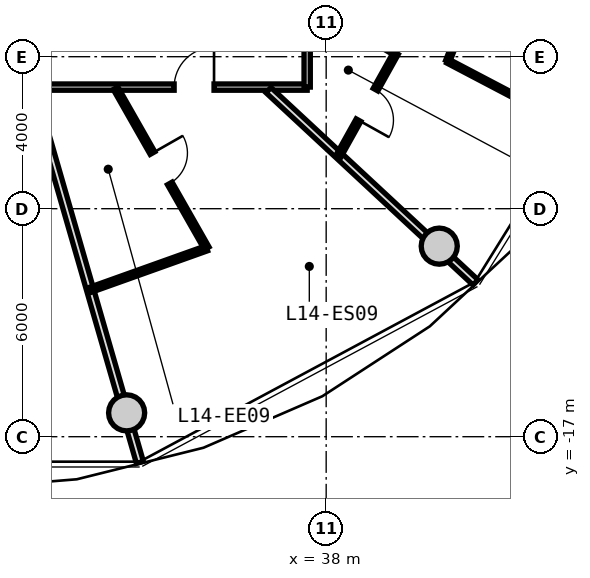
"""IFC4 building model, lengths in metres.
Left out: names, types, materials, properties, quantities, classifications, styles, units other than length and angle.
Written with IfcOpenShell. Run it as: python <this file> out.ifc"""

import sys

from ifc_helpers import new_model, si_unit, direction, frame, frame_2d, origin, origin_2d, place, context, subcontext, project, spatial, rectangle, circle, extrude, source, transform, mapped, element, fill, save


model = new_model("IFC4")
c1 = context("Model", 3, precision=1e-05, world=origin(), true_north=direction((0.0, 1.0)))
c2 = subcontext(c1, "Body", "Model", "MODEL_VIEW")
j1 = project(units=[si_unit("LENGTHUNIT", "METRE"), si_unit("PLANEANGLEUNIT", "RADIAN")], contexts=[c1])
p1 = place(None, origin())
s1 = spatial("IfcSite", under=j1, at=p1, CompositionType="ELEMENT")
p2 = place(p1, origin())
s2 = spatial("IfcBuilding", under=s1, at=p2, CompositionType="ELEMENT")
p3 = place(p2, frame((0.0, 0.0, 49.05)))
s3 = spatial("IfcBuildingStorey", under=s2, at=p3, CompositionType="ELEMENT", Elevation=49.05)
m1 = source(origin(), c2, "Body", "SweptSolid", [
    extrude(circle(Radius=0.475, at=origin_2d()), origin(), (0.0, 0.0, 1.0), 3.05),
])
for number, where, z_axis, x_axis in (
    (1, (32.749, -16.373, 0.0), (0.0, 0.0, 1.0), (1.0, 0.0, 0.0)),
    (2, (40.975, -11.985, 0.0), (0.0, 0.0, 1.0), (1.0, 0.0, 0.0)),
):
    element("IfcColumn", number, at=place(p3, frame(where, z_axis=z_axis, x_axis=x_axis)), inside=s3, PredefinedType="COLUMN", context=c2, shape_type="MappedRepresentation", body=[
        mapped(m1, transform((0.0, 0.0, 0.0), x_axis=(1.0, 0.0, 0.0), y_axis=(0.0, 1.0, 0.0), z_axis=(0.0, 0.0, 1.0), scale=1.0)),
    ])
m2 = source(origin(), c2, "Body", "SweptSolid", [
    extrude(rectangle(XDim=19.0, YDim=0.165, at=frame_2d((9.5, 0.0))), origin(), (0.0, 0.0, 1.0), 2.775),
])
p4 = place(p3, frame((37.5, -7.8, 0.0), z_axis=(0.0, 0.0, 1.0), x_axis=(-1.0, 0.0, 0.0)))
e3 = element("IfcWall", 3, at=p4, inside=s3, PredefinedType="PARTITIONING", context=c2, shape_type="MappedRepresentation", body=[
    mapped(m2, transform((0.0, 0.0, 0.0), x_axis=(1.0, 0.0, 0.0), y_axis=(0.0, 1.0, 0.0), z_axis=(0.0, 0.0, 1.0), scale=1.0)),
])
p5 = place(p4, frame((12.706, 0.0, 0.0)))
e4 = element("IfcOpeningElement", 4, at=p5, cuts=e3, PredefinedType="OPENING", context=c2, shape_type="SweptSolid", body=[
    extrude(rectangle(XDim=1.05, YDim=2.15, at=frame_2d((0.525, 1.075))), frame((0.0, 0.093, 0.0), z_axis=(0.0, -1.0, 0.0), x_axis=(1.0, 0.0, 0.0)), (0.0, 0.0, 1.0), 0.185),
])
p6 = place(p4, frame((7.959, 0.0, 0.0)))
e5 = element("IfcOpeningElement", 5, at=p6, cuts=e3, PredefinedType="OPENING", context=c2, shape_type="SweptSolid", body=[
    extrude(rectangle(XDim=1.05, YDim=2.15, at=frame_2d((0.525, 1.075))), frame((0.0, 0.093, 0.0), z_axis=(0.0, -1.0, 0.0), x_axis=(1.0, 0.0, 0.0)), (0.0, 0.0, 1.0), 0.185),
])
p7 = place(p4, frame((2.451, 0.0, 0.0)))
e6 = element("IfcOpeningElement", 6, at=p7, cuts=e3, PredefinedType="OPENING", context=c2, shape_type="SweptSolid", body=[
    extrude(rectangle(XDim=1.05, YDim=2.15, at=frame_2d((0.525, 1.075))), frame((0.0, 0.093, 0.0), z_axis=(0.0, -1.0, 0.0), x_axis=(1.0, 0.0, 0.0)), (0.0, 0.0, 1.0), 0.185),
])
m3 = source(origin(), c2, "Body", "SweptSolid", [
    extrude(rectangle(XDim=15.6, YDim=0.165, at=frame_2d((7.8, 0.0))), origin(), (0.0, 0.0, 1.0), 2.775),
])
p8 = place(p3, frame((37.5, 7.8, 0.0), z_axis=(0.0, 0.0, 1.0), x_axis=(0.0, -1.0, 0.0)))
e7 = element("IfcWall", 7, at=p8, inside=s3, PredefinedType="PARTITIONING", context=c2, shape_type="MappedRepresentation", body=[
    mapped(m3, transform((0.0, 0.0, 0.0), x_axis=(1.0, 0.0, 0.0), y_axis=(0.0, 1.0, 0.0), z_axis=(0.0, 0.0, 1.0), scale=1.0)),
])
p9 = place(p8, frame((8.835, 0.0, 0.0)))
e8 = element("IfcOpeningElement", 8, at=p9, cuts=e7, PredefinedType="OPENING", context=c2, shape_type="SweptSolid", body=[
    extrude(rectangle(XDim=1.05, YDim=2.15, at=frame_2d((0.525, 1.075))), frame((0.0, 0.093, 0.0), z_axis=(0.0, -1.0, 0.0), x_axis=(1.0, 0.0, 0.0)), (0.0, 0.0, 1.0), 0.185),
])
p10 = place(p8, frame((2.208, 0.0, 0.0)))
e9 = element("IfcOpeningElement", 9, at=p10, cuts=e7, PredefinedType="OPENING", context=c2, shape_type="SweptSolid", body=[
    extrude(rectangle(XDim=1.25, YDim=2.2, at=frame_2d((0.625, 1.1))), frame((0.0, 0.093, 0.0), z_axis=(0.0, -1.0, 0.0), x_axis=(1.0, 0.0, 0.0)), (0.0, 0.0, 1.0), 0.185),
])
m4 = source(origin(), c2, "Body", "SweptSolid", [
    extrude(rectangle(XDim=10.196, YDim=0.19, at=frame_2d((5.098, 0.0))), origin(), (0.0, 0.0, 1.0), 2.225),
])
p11 = place(p3, frame((30.273, -7.88, 0.0), z_axis=(0.0, 0.0, 1.0), x_axis=(0.277136420347, -0.960830580549, 0.0)))
e10 = element("IfcWall", 10, at=p11, inside=s3, PredefinedType="PARTITIONING", context=c2, shape_type="MappedRepresentation", body=[
    mapped(m4, transform((0.0, 0.0, 0.0), x_axis=(1.0, 0.0, 0.0), y_axis=(0.0, 1.0, 0.0), z_axis=(0.0, 0.0, 1.0), scale=1.0)),
])
m5 = source(origin(), c2, "Body", "SweptSolid", [
    extrude(rectangle(XDim=7.435, YDim=0.19, at=frame_2d((3.717, 0.0))), origin(), (0.0, 0.0, 1.0), 2.225),
])
p12 = place(p3, frame((36.483, -7.88, 0.0), z_axis=(0.0, 0.0, 1.0), x_axis=(0.732651956848, -0.680603489652, 0.0)))
e11 = element("IfcWall", 11, at=p12, inside=s3, PredefinedType="PARTITIONING", context=c2, shape_type="MappedRepresentation", body=[
    mapped(m5, transform((0.0, 0.0, 0.0), x_axis=(1.0, 0.0, 0.0), y_axis=(0.0, 1.0, 0.0), z_axis=(0.0, 0.0, 1.0), scale=1.0)),
])
m6 = source(origin(), c2, "Body", "SweptSolid", [
    extrude(rectangle(XDim=4.846, YDim=0.14, at=frame_2d((2.423, 0.0))), origin(), (0.0, 0.0, 1.0), 2.775),
])
p13 = place(p3, frame((32.458, -7.83, 0.0), z_axis=(0.0, 0.0, 1.0), x_axis=(0.494841788743, -0.868983086207, 0.0)))
e12 = element("IfcWall", 12, at=p13, inside=s3, PredefinedType="PARTITIONING", context=c2, shape_type="MappedRepresentation", body=[
    mapped(m6, transform((0.0, 0.0, 0.0), x_axis=(1.0, 0.0, 0.0), y_axis=(0.0, 1.0, 0.0), z_axis=(0.0, 0.0, 1.0), scale=1.0)),
])
p14 = place(p13, frame((1.963, 0.0, 0.0)))
e13 = element("IfcOpeningElement", 13, at=p14, cuts=e12, PredefinedType="OPENING", context=c2, shape_type="SweptSolid", body=[
    extrude(rectangle(XDim=0.92, YDim=2.1, at=frame_2d((0.46, 1.05))), frame((0.0, 0.08, 0.0), z_axis=(0.0, -1.0, 0.0), x_axis=(1.0, 0.0, 0.0)), (0.0, 0.0, 1.0), 0.16),
])
m7 = source(origin(), c2, "Body", "SweptSolid", [
    extrude(rectangle(XDim=3.276, YDim=0.14, at=frame_2d((1.638, 0.0))), origin(), (0.0, 0.0, 1.0), 2.415),
])
p15 = place(p3, frame((34.857, -12.042, 0.0), z_axis=(0.0, 0.0, 1.0), x_axis=(-0.94174696961, -0.336322234221, 0.0)))
e14 = element("IfcWall", 14, at=p15, inside=s3, PredefinedType="PARTITIONING", context=c2, shape_type="MappedRepresentation", body=[
    mapped(m7, transform((0.0, 0.0, 0.0), x_axis=(1.0, 0.0, 0.0), y_axis=(0.0, 1.0, 0.0), z_axis=(0.0, 0.0, 1.0), scale=1.0)),
])
m8 = source(origin(), c2, "Body", "SweptSolid", [
    extrude(rectangle(XDim=2.669, YDim=0.14, at=frame_2d((1.335, 0.0))), origin(), (0.0, 0.0, 1.0), 2.775),
])
p16 = place(p3, frame((37.53, -5.561, 0.0), z_axis=(0.0, 0.0, 1.0), x_axis=(0.86369928178, -0.50400749067, 0.0)))
e15 = element("IfcWall", 15, at=p16, inside=s3, PredefinedType="PARTITIONING", context=c2, shape_type="MappedRepresentation", body=[
    mapped(m8, transform((0.0, 0.0, 0.0), x_axis=(1.0, 0.0, 0.0), y_axis=(0.0, 1.0, 0.0), z_axis=(0.0, 0.0, 1.0), scale=1.0)),
])
m9 = source(origin(), c2, "Body", "SweptSolid", [
    extrude(rectangle(XDim=3.121, YDim=0.14, at=frame_2d((1.561, 0.0))), origin(), (0.0, 0.0, 1.0), 2.775),
])
p17 = place(p3, frame((39.836, -6.906, 0.0), z_axis=(0.0, 0.0, 1.0), x_axis=(-0.487302357327, -0.873233309342, 0.0)))
e16 = element("IfcWall", 16, at=p17, inside=s3, PredefinedType="PARTITIONING", context=c2, shape_type="MappedRepresentation", body=[
    mapped(m9, transform((0.0, 0.0, 0.0), x_axis=(1.0, 0.0, 0.0), y_axis=(0.0, 1.0, 0.0), z_axis=(0.0, 0.0, 1.0), scale=1.0)),
])
p18 = place(p17, frame((1.101, 0.0, 0.0)))
e17 = element("IfcOpeningElement", 17, at=p18, cuts=e16, PredefinedType="OPENING", context=c2, shape_type="SweptSolid", body=[
    extrude(rectangle(XDim=0.92, YDim=2.1, at=frame_2d((0.46, 1.05))), frame((0.0, 0.08, 0.0), z_axis=(0.0, -1.0, 0.0), x_axis=(1.0, 0.0, 0.0)), (0.0, 0.0, 1.0), 0.16),
])
m10 = source(origin(), c2, "Body", "SweptSolid", [
    extrude(rectangle(XDim=3.706, YDim=0.115, at=frame_2d((1.853, 0.0))), origin(), (0.0, 0.0, 1.0), 2.775),
])
p19 = place(p3, frame((41.198, -7.115, 0.0), z_axis=(0.0, 0.0, 1.0), x_axis=(0.88538502503, -0.464858427322, 0.0)))
e18 = element("IfcWall", 18, at=p19, inside=s3, PredefinedType="PARTITIONING", context=c2, shape_type="MappedRepresentation", body=[
    mapped(m10, transform((0.0, 0.0, 0.0), x_axis=(1.0, 0.0, 0.0), y_axis=(0.0, 1.0, 0.0), z_axis=(0.0, 0.0, 1.0), scale=1.0)),
])
m11 = source(origin(), c2, "Body", "SweptSolid", [
    extrude(rectangle(XDim=3.729, YDim=0.115, at=frame_2d((1.864, 0.0))), origin(), (0.0, 0.0, 1.0), 2.775),
])
p20 = place(p3, frame((41.198, -7.115, 0.0), z_axis=(0.0, 0.0, 1.0), x_axis=(0.363055991464, 0.93176732453, 0.0)))
e19 = element("IfcWall", 19, at=p20, inside=s3, PredefinedType="PARTITIONING", context=c2, shape_type="MappedRepresentation", body=[
    mapped(m11, transform((0.0, 0.0, 0.0), x_axis=(1.0, 0.0, 0.0), y_axis=(0.0, 1.0, 0.0), z_axis=(0.0, 0.0, 1.0), scale=1.0)),
])
p21 = place(p20, frame((1.389, 0.0, 0.0)))
e20 = element("IfcOpeningElement", 20, at=p21, cuts=e19, PredefinedType="OPENING", context=c2, shape_type="SweptSolid", body=[
    extrude(rectangle(XDim=0.95, YDim=2.1, at=frame_2d((0.475, 1.05))), frame((0.0, 0.067, 0.0), z_axis=(0.0, -1.0, 0.0), x_axis=(1.0, 0.0, 0.0)), (0.0, 0.0, 1.0), 0.135),
])
m12 = source(origin(), c2, "Body", "SweptSolid", [
    extrude(rectangle(XDim=1.05, YDim=2.15, at=frame_2d((0.525, 1.075))), frame((0.0, 0.025, 0.0), z_axis=(0.0, -1.0, 0.0), x_axis=(1.0, 0.0, 0.0)), (0.0, 0.0, 1.0), 0.05),
])
p22 = place(p7, frame((1.05, 0.0, 0.0), z_axis=(0.0, 0.0, 1.0), x_axis=(-1.0, 0.0, 0.0)))
e21 = element("IfcDoor", 21, at=p22, inside=s3, OperationType="SINGLE_SWING_RIGHT", PredefinedType="DOOR", context=c2, shape_type="MappedRepresentation", body=[
    mapped(m12, transform((0.0, 0.0, 0.0), x_axis=(1.0, 0.0, 0.0), y_axis=(0.0, 1.0, 0.0), z_axis=(0.0, 0.0, 1.0), scale=1.0)),
])
fill(e6, e21)
m13 = source(origin(), c2, "Body", "SweptSolid", [
    extrude(rectangle(XDim=0.92, YDim=2.1, at=frame_2d((0.46, 1.05))), frame((0.0, 0.025, 0.0), z_axis=(0.0, -1.0, 0.0), x_axis=(1.0, 0.0, 0.0)), (0.0, 0.0, 1.0), 0.05),
])
p23 = place(p14, origin())
e22 = element("IfcDoor", 22, at=p23, inside=s3, OperationType="SINGLE_SWING_LEFT", PredefinedType="DOOR", context=c2, shape_type="MappedRepresentation", body=[
    mapped(m13, transform((0.0, 0.0, 0.0), x_axis=(1.0, 0.0, 0.0), y_axis=(0.0, 1.0, 0.0), z_axis=(0.0, 0.0, 1.0), scale=1.0)),
])
fill(e13, e22)
p24 = place(p18, origin())
e23 = element("IfcDoor", 23, at=p24, inside=s3, OperationType="SINGLE_SWING_RIGHT", PredefinedType="DOOR", context=c2, shape_type="MappedRepresentation", body=[
    mapped(m13, transform((0.0, 0.0, 0.0), x_axis=(1.0, 0.0, 0.0), y_axis=(0.0, 1.0, 0.0), z_axis=(0.0, 0.0, 1.0), scale=1.0)),
])
fill(e17, e23)
save(model, sys.argv[1])
